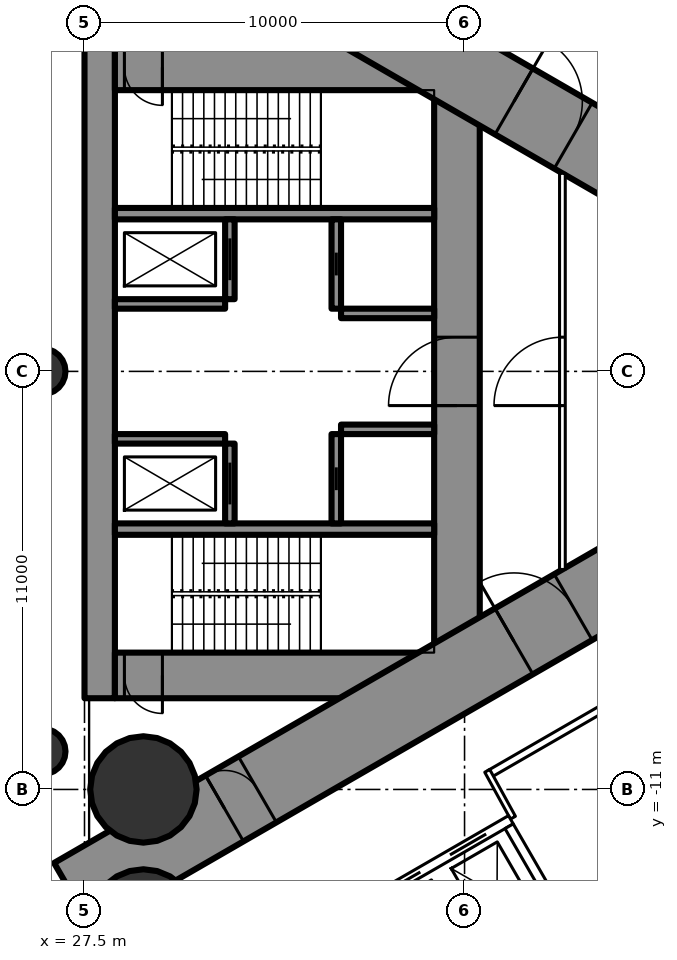
"""IFC4 building model, lengths in metres.
Left out: names, types, materials, properties, quantities, classifications, styles, units other than length and angle.
Written with IfcOpenShell. Run it as: python <this file> out.ifc"""

import sys

from ifc_helpers import new_model, si_unit, direction, frame, frame_2d, origin, origin_2d, place, context, subcontext, project, spatial, rectangle, circle, hollow_circle, extrude, element, fill, save


model = new_model("IFC4")
c1 = context("Model", 3, precision=1e-05, world=origin(), true_north=direction((0.0, 1.0)))
c2 = subcontext(c1, "Body", "Model", "MODEL_VIEW")
j1 = project(units=[si_unit("LENGTHUNIT", "METRE"), si_unit("PLANEANGLEUNIT", "RADIAN")], contexts=[c1])
p1 = place(None, origin())
s1 = spatial("IfcSite", under=j1, at=p1, CompositionType="ELEMENT")
p2 = place(p1, origin())
s2 = spatial("IfcBuilding", under=s1, at=p2, CompositionType="ELEMENT")
p3 = place(p2, frame((0.0, 0.0, 7.2)))
s3 = spatial("IfcBuildingStorey", under=s2, at=p3, CompositionType="ELEMENT", Elevation=7.2)
for number, where, z_axis, x_axis in (
    (1, (29.05, -11.0, 0.0), (0.0, 0.0, 1.0), (1.0, 0.0, 0.0)),
    (2, (29.05, -14.5, 0.0), (0.0, 0.0, 1.0), (1.0, 0.0, 0.0)),
):
    element("IfcColumn", number, at=place(p3, frame(where, z_axis=z_axis, x_axis=x_axis)), inside=s3, PredefinedType="COLUMN", context=c2, shape_type="SweptSolid", body=[
        extrude(hollow_circle(Radius=1.4, WallThickness=0.12, at=origin_2d()), origin(), (0.0, 0.0, 1.0), 5.4),
    ])
p4 = place(p3, frame((27.9, -8.6, 0.0), z_axis=(0.0, 0.0, 1.0), x_axis=(0.0, 1.0, 0.0)))
e3 = element("IfcWall", 3, at=p4, inside=s3, PredefinedType="SHEAR", context=c2, shape_type="SweptSolid", body=[
    extrude(rectangle(XDim=17.2, YDim=0.8, at=frame_2d((8.6, 0.0))), origin(), (0.0, 0.0, 1.0), 5.4),
])
p5 = place(p3, frame((37.3, -8.6, 0.0), z_axis=(0.0, 0.0, 1.0), x_axis=(0.0, 1.0, 0.0)))
e4 = element("IfcWall", 4, at=p5, inside=s3, PredefinedType="SHEAR", context=c2, shape_type="SweptSolid", body=[
    extrude(rectangle(XDim=17.2, YDim=1.2, at=frame_2d((8.6, 0.0))), origin(), (0.0, 0.0, 1.0), 5.4),
])
p6 = place(p5, frame((7.7, 0.0, 0.0)))
e5 = element("IfcOpeningElement", 5, at=p6, cuts=e4, PredefinedType="OPENING", context=c2, shape_type="SweptSolid", body=[
    extrude(rectangle(XDim=1.8, YDim=2.2, at=frame_2d((0.9, 1.1))), frame((0.0, 0.61, 0.0), z_axis=(0.0, -1.0, 0.0), x_axis=(1.0, 0.0, 0.0)), (0.0, 0.0, 1.0), 1.22),
])
p7 = place(p3, frame((28.3, -8.0, 0.0), z_axis=(0.0, 0.0, 1.0), x_axis=(1.0, 0.0, 0.0)))
e6 = element("IfcWall", 6, at=p7, inside=s3, PredefinedType="SHEAR", context=c2, shape_type="SweptSolid", body=[
    extrude(rectangle(XDim=8.4, YDim=1.2, at=frame_2d((4.2, 0.0))), origin(), (0.0, 0.0, 1.0), 5.4),
])
p8 = place(p7, frame((0.25, 0.0, 0.0)))
e7 = element("IfcOpeningElement", 7, at=p8, cuts=e6, PredefinedType="OPENING", context=c2, shape_type="SweptSolid", body=[
    extrude(rectangle(XDim=1.0, YDim=2.2, at=frame_2d((0.5, 1.1))), frame((0.0, 0.61, 0.0), z_axis=(0.0, -1.0, 0.0), x_axis=(1.0, 0.0, 0.0)), (0.0, 0.0, 1.0), 1.22),
])
p9 = place(p3, frame((28.3, 8.0, 0.0), z_axis=(0.0, 0.0, 1.0), x_axis=(1.0, 0.0, 0.0)))
e8 = element("IfcWall", 8, at=p9, inside=s3, PredefinedType="SHEAR", context=c2, shape_type="SweptSolid", body=[
    extrude(rectangle(XDim=8.4, YDim=1.2, at=frame_2d((4.2, 0.0))), origin(), (0.0, 0.0, 1.0), 5.4),
])
p10 = place(p9, frame((0.25, 0.0, 0.0)))
e9 = element("IfcOpeningElement", 9, at=p10, cuts=e8, PredefinedType="OPENING", context=c2, shape_type="SweptSolid", body=[
    extrude(rectangle(XDim=1.0, YDim=2.2, at=frame_2d((0.5, 1.1))), frame((0.0, 0.61, 0.0), z_axis=(0.0, -1.0, 0.0), x_axis=(1.0, 0.0, 0.0)), (0.0, 0.0, 1.0), 1.22),
])
for number, where, z_axis, x_axis in (
    (10, (28.3, -4.15, 0.0), (0.0, 0.0, 1.0), (1.0, 0.0, 0.0)),
    (11, (28.3, 4.15, 0.0), (0.0, 0.0, 1.0), (1.0, 0.0, 0.0)),
):
    element("IfcWall", number, at=place(p3, frame(where, z_axis=z_axis, x_axis=x_axis)), inside=s3, PredefinedType="SHEAR", context=c2, shape_type="SweptSolid", body=[
        extrude(rectangle(XDim=8.4, YDim=0.3, at=frame_2d((4.2, 0.0))), origin(), (0.0, 0.0, 1.0), 5.4),
    ])
p11 = place(p3, frame((31.325, -4.0, 0.0), z_axis=(0.0, 0.0, 1.0), x_axis=(0.0, 1.0, 0.0)))
e12 = element("IfcWall", 12, at=p11, inside=s3, PredefinedType="SHEAR", context=c2, shape_type="SweptSolid", body=[
    extrude(rectangle(XDim=2.1, YDim=0.25, at=frame_2d((1.05, 0.0))), origin(), (0.0, 0.0, 1.0), 5.4),
])
p12 = place(p11, frame((0.5, 0.0, 0.0)))
e13 = element("IfcOpeningElement", 13, at=p12, cuts=e12, PredefinedType="OPENING", context=c2, shape_type="SweptSolid", body=[
    extrude(rectangle(XDim=1.1, YDim=2.2, at=frame_2d((0.55, 1.1))), frame((0.0, 0.135, 0.0), z_axis=(0.0, -1.0, 0.0), x_axis=(1.0, 0.0, 0.0)), (0.0, 0.0, 1.0), 0.27),
])
p13 = place(p3, frame((34.125, -4.0, 0.0), z_axis=(0.0, 0.0, 1.0), x_axis=(0.0, 1.0, 0.0)))
e14 = element("IfcWall", 14, at=p13, inside=s3, PredefinedType="SHEAR", context=c2, shape_type="SweptSolid", body=[
    extrude(rectangle(XDim=2.35, YDim=0.25, at=frame_2d((1.175, 0.0))), origin(), (0.0, 0.0, 1.0), 5.4),
])
p14 = place(p13, frame((0.875, 0.0, 0.0)))
e15 = element("IfcOpeningElement", 15, at=p14, cuts=e14, PredefinedType="OPENING", context=c2, shape_type="SweptSolid", body=[
    extrude(rectangle(XDim=0.6, YDim=2.0, at=frame_2d((0.3, 1.0))), frame((0.0, 0.135, 0.0), z_axis=(0.0, -1.0, 0.0), x_axis=(1.0, 0.0, 0.0)), (0.0, 0.0, 1.0), 0.27),
])
p15 = place(p3, frame((28.3, -1.775, 0.0), z_axis=(0.0, 0.0, 1.0), x_axis=(1.0, 0.0, 0.0)))
e16 = element("IfcWall", 16, at=p15, inside=s3, PredefinedType="SHEAR", context=c2, shape_type="SweptSolid", body=[
    extrude(rectangle(XDim=2.9, YDim=0.25, at=frame_2d((1.45, 0.0))), origin(), (0.0, 0.0, 1.0), 5.4),
])
p16 = place(p3, frame((34.25, -1.525, 0.0), z_axis=(0.0, 0.0, 1.0), x_axis=(1.0, 0.0, 0.0)))
e17 = element("IfcWall", 17, at=p16, inside=s3, PredefinedType="SHEAR", context=c2, shape_type="SweptSolid", body=[
    extrude(rectangle(XDim=2.45, YDim=0.25, at=frame_2d((1.225, 0.0))), origin(), (0.0, 0.0, 1.0), 5.4),
])
p17 = place(p3, frame((31.325, 1.9, 0.0), z_axis=(0.0, 0.0, 1.0), x_axis=(0.0, 1.0, 0.0)))
e18 = element("IfcWall", 18, at=p17, inside=s3, PredefinedType="SHEAR", context=c2, shape_type="SweptSolid", body=[
    extrude(rectangle(XDim=2.1, YDim=0.25, at=frame_2d((1.05, 0.0))), origin(), (0.0, 0.0, 1.0), 5.4),
])
p18 = place(p17, frame((0.5, 0.0, 0.0)))
e19 = element("IfcOpeningElement", 19, at=p18, cuts=e18, PredefinedType="OPENING", context=c2, shape_type="SweptSolid", body=[
    extrude(rectangle(XDim=1.1, YDim=2.2, at=frame_2d((0.55, 1.1))), frame((0.0, 0.135, 0.0), z_axis=(0.0, -1.0, 0.0), x_axis=(1.0, 0.0, 0.0)), (0.0, 0.0, 1.0), 0.27),
])
p19 = place(p3, frame((34.125, 1.65, 0.0), z_axis=(0.0, 0.0, 1.0), x_axis=(0.0, 1.0, 0.0)))
e20 = element("IfcWall", 20, at=p19, inside=s3, PredefinedType="SHEAR", context=c2, shape_type="SweptSolid", body=[
    extrude(rectangle(XDim=2.35, YDim=0.25, at=frame_2d((1.175, 0.0))), origin(), (0.0, 0.0, 1.0), 5.4),
])
p20 = place(p19, frame((0.875, 0.0, 0.0)))
e21 = element("IfcOpeningElement", 21, at=p20, cuts=e20, PredefinedType="OPENING", context=c2, shape_type="SweptSolid", body=[
    extrude(rectangle(XDim=0.6, YDim=2.0, at=frame_2d((0.3, 1.0))), frame((0.0, 0.135, 0.0), z_axis=(0.0, -1.0, 0.0), x_axis=(1.0, 0.0, 0.0)), (0.0, 0.0, 1.0), 0.27),
])
p21 = place(p3, frame((28.3, 1.775, 0.0), z_axis=(0.0, 0.0, 1.0), x_axis=(1.0, 0.0, 0.0)))
e22 = element("IfcWall", 22, at=p21, inside=s3, PredefinedType="SHEAR", context=c2, shape_type="SweptSolid", body=[
    extrude(rectangle(XDim=2.9, YDim=0.25, at=frame_2d((1.45, 0.0))), origin(), (0.0, 0.0, 1.0), 5.4),
])
p22 = place(p3, frame((34.25, 1.525, 0.0), z_axis=(0.0, 0.0, 1.0), x_axis=(1.0, 0.0, 0.0)))
e23 = element("IfcWall", 23, at=p22, inside=s3, PredefinedType="SHEAR", context=c2, shape_type="SweptSolid", body=[
    extrude(rectangle(XDim=2.45, YDim=0.25, at=frame_2d((1.225, 0.0))), origin(), (0.0, 0.0, 1.0), 5.4),
])
p23 = place(p3, frame((27.2, -13.8, 0.0), z_axis=(0.0, 0.0, 1.0), x_axis=(0.866027159892, 0.499996958321, 0.0)))
e24 = element("IfcWall", 24, at=p23, inside=s3, PredefinedType="SHEAR", context=c2, shape_type="SweptSolid", body=[
    extrude(rectangle(XDim=27.947, YDim=2.0, at=frame_2d((13.973, 0.0))), origin(), (0.0, 0.0, 1.0), 5.4),
])
p24 = place(p23, frame((4.6, 0.0, 0.0)))
e25 = element("IfcOpeningElement", 25, at=p24, cuts=e24, PredefinedType="OPENING", context=c2, shape_type="SweptSolid", body=[
    extrude(rectangle(XDim=1.0, YDim=2.2, at=frame_2d((0.5, 1.1))), frame((0.0, 1.01, 0.0), z_axis=(0.0, -1.0, 0.0), x_axis=(1.0, 0.0, 0.0)), (0.0, 0.0, 1.0), 2.02),
])
p25 = place(p23, frame((13.395, 0.0, 0.0)))
e26 = element("IfcOpeningElement", 26, at=p25, cuts=e24, PredefinedType="OPENING", context=c2, shape_type="SweptSolid", body=[
    extrude(rectangle(XDim=1.8, YDim=2.2, at=frame_2d((0.9, 1.1))), frame((0.0, 1.01, 0.0), z_axis=(0.0, -1.0, 0.0), x_axis=(1.0, 0.0, 0.0)), (0.0, 0.0, 1.0), 2.02),
])
p26 = place(p3, frame((27.2, 13.8, 0.0), z_axis=(0.0, 0.0, 1.0), x_axis=(0.866024545924, -0.500001485854, 0.0)))
e27 = element("IfcWall", 27, at=p26, inside=s3, PredefinedType="SHEAR", context=c2, shape_type="SweptSolid", body=[
    extrude(rectangle(XDim=26.534, YDim=2.0, at=frame_2d((13.267, 0.0))), origin(), (0.0, 0.0, 1.0), 5.4),
])
p27 = place(p26, frame((4.6, 0.0, 0.0)))
e28 = element("IfcOpeningElement", 28, at=p27, cuts=e27, PredefinedType="OPENING", context=c2, shape_type="SweptSolid", body=[
    extrude(rectangle(XDim=1.0, YDim=2.2, at=frame_2d((0.5, 1.1))), frame((0.0, 1.01, 0.0), z_axis=(0.0, -1.0, 0.0), x_axis=(1.0, 0.0, 0.0)), (0.0, 0.0, 1.0), 2.02),
])
p28 = place(p26, frame((13.395, 0.0, 0.0)))
e29 = element("IfcOpeningElement", 29, at=p28, cuts=e27, PredefinedType="OPENING", context=c2, shape_type="SweptSolid", body=[
    extrude(rectangle(XDim=1.8, YDim=2.2, at=frame_2d((0.9, 1.1))), frame((0.0, 1.01, 0.0), z_axis=(0.0, -1.0, 0.0), x_axis=(1.0, 0.0, 0.0)), (0.0, 0.0, 1.0), 2.02),
])
for number, where, z_axis, x_axis in (
    (30, (26.4, -10.0, 0.0), (0.0, 0.0, 1.0), (1.0, 0.0, 0.0)),
    (31, (26.4, 0.0, 0.0), (0.0, 0.0, 1.0), (1.0, 0.0, 0.0)),
):
    element("IfcColumn", number, at=place(p3, frame(where, z_axis=z_axis, x_axis=x_axis)), inside=s3, PredefinedType="COLUMN", context=c2, shape_type="SweptSolid", body=[
        extrude(circle(Radius=0.6, at=origin_2d()), origin(), (0.0, 0.0, 1.0), 5.4),
    ])
p29 = place(p3, frame((38.16, -10.59, 0.0), z_axis=(0.0, 0.0, 1.0), x_axis=(0.866027029586, 0.499997184019, 0.0)))
e32 = element("IfcWall", 32, at=p29, inside=s3, PredefinedType="PARTITIONING", context=c2, shape_type="SweptSolid", body=[
    extrude(rectangle(XDim=21.18, YDim=0.2, at=frame_2d((10.59, 0.0))), origin(), (0.0, 0.0, 1.0), 5.05),
])
p30 = place(p29, frame((14.142, 0.0, 0.0)))
e33 = element("IfcOpeningElement", 33, at=p30, cuts=e32, PredefinedType="OPENING", context=c2, shape_type="SweptSolid", body=[
    extrude(rectangle(XDim=1.8, YDim=2.2, at=frame_2d((0.9, 1.1))), frame((0.0, 0.11, 0.0), z_axis=(0.0, -1.0, 0.0), x_axis=(1.0, 0.0, 0.0)), (0.0, 0.0, 1.0), 0.22),
])
p31 = place(p29, frame((18.183, 0.0, 0.0)))
e34 = element("IfcOpeningElement", 34, at=p31, cuts=e32, PredefinedType="OPENING", context=c2, shape_type="SweptSolid", body=[
    extrude(rectangle(XDim=1.8, YDim=2.2, at=frame_2d((0.9, 1.1))), frame((0.0, 0.11, 0.0), z_axis=(0.0, -1.0, 0.0), x_axis=(1.0, 0.0, 0.0)), (0.0, 0.0, 1.0), 0.22),
])
p32 = place(p29, frame((5.65, 0.0, 0.0)))
e35 = element("IfcOpeningElement", 35, at=p32, cuts=e32, PredefinedType="OPENING", context=c2, shape_type="SweptSolid", body=[
    extrude(rectangle(XDim=1.8, YDim=2.2, at=frame_2d((0.9, 1.1))), frame((0.0, 0.11, 0.0), z_axis=(0.0, -1.0, 0.0), x_axis=(1.0, 0.0, 0.0)), (0.0, 0.0, 1.0), 0.22),
])
p33 = place(p3, frame((37.034, 11.24, 0.0), z_axis=(0.0, 0.0, 1.0), x_axis=(0.866025942536, -0.499999066854, 0.0)))
e36 = element("IfcWall", 36, at=p33, inside=s3, PredefinedType="PARTITIONING", context=c2, shape_type="SweptSolid", body=[
    extrude(rectangle(XDim=22.36, YDim=0.2, at=frame_2d((11.18, 0.0))), origin(), (0.0, 0.0, 1.0), 5.05),
])
p34 = place(p33, frame((19.423, 0.0, 0.0)))
e37 = element("IfcOpeningElement", 37, at=p34, cuts=e36, PredefinedType="OPENING", context=c2, shape_type="SweptSolid", body=[
    extrude(rectangle(XDim=1.8, YDim=2.2, at=frame_2d((0.9, 1.1))), frame((0.0, 0.11, 0.0), z_axis=(0.0, -1.0, 0.0), x_axis=(1.0, 0.0, 0.0)), (0.0, 0.0, 1.0), 0.22),
])
p35 = place(p33, frame((13.274, 0.0, 0.0)))
e38 = element("IfcOpeningElement", 38, at=p35, cuts=e36, PredefinedType="OPENING", context=c2, shape_type="SweptSolid", body=[
    extrude(rectangle(XDim=1.8, YDim=2.2, at=frame_2d((0.9, 1.1))), frame((0.0, 0.11, 0.0), z_axis=(0.0, -1.0, 0.0), x_axis=(1.0, 0.0, 0.0)), (0.0, 0.0, 1.0), 0.22),
])
p36 = place(p33, frame((4.602, 0.0, 0.0)))
e39 = element("IfcOpeningElement", 39, at=p36, cuts=e36, PredefinedType="OPENING", context=c2, shape_type="SweptSolid", body=[
    extrude(rectangle(XDim=1.8, YDim=2.2, at=frame_2d((0.9, 1.1))), frame((0.0, 0.11, 0.0), z_axis=(0.0, -1.0, 0.0), x_axis=(1.0, 0.0, 0.0)), (0.0, 0.0, 1.0), 0.22),
])
p37 = place(p3, frame((38.773, -11.742, 0.0), z_axis=(0.0, 0.0, 1.0), x_axis=(-0.481418475768, 0.876490873421, 0.0)))
e40 = element("IfcWall", 40, at=p37, inside=s3, PredefinedType="PARTITIONING", context=c2, shape_type="SweptSolid", body=[
    extrude(rectangle(XDim=1.405, YDim=0.15, at=frame_2d((0.703, 0.0))), origin(), (0.0, 0.0, 1.0), 5.05),
])
p38 = place(p3, frame((40.075, -5.212, 0.0), z_axis=(0.0, 0.0, 1.0), x_axis=(0.0, 1.0, 0.0)))
e41 = element("IfcWall", 41, at=p38, inside=s3, PredefinedType="PARTITIONING", context=c2, shape_type="SweptSolid", body=[
    extrude(rectangle(XDim=10.424, YDim=0.15, at=frame_2d((5.212, 0.0))), origin(), (0.0, 0.0, 1.0), 5.05),
])
p39 = place(p38, frame((4.312, 0.0, 0.0)))
e42 = element("IfcOpeningElement", 42, at=p39, cuts=e41, PredefinedType="OPENING", context=c2, shape_type="SweptSolid", body=[
    extrude(rectangle(XDim=1.8, YDim=2.2, at=frame_2d((0.9, 1.1))), frame((0.0, 0.085, 0.0), z_axis=(0.0, -1.0, 0.0), x_axis=(1.0, 0.0, 0.0)), (0.0, 0.0, 1.0), 0.17),
])
p40 = place(p3, frame((31.271, -16.097, 0.0), z_axis=(0.0, 0.0, 1.0), x_axis=(0.86604045752, 0.499973925258, 0.0)))
e43 = element("IfcWall", 43, at=p40, inside=s3, PredefinedType="PARTITIONING", context=c2, shape_type="SweptSolid", body=[
    extrude(rectangle(XDim=8.6, YDim=0.25, at=frame_2d((4.3, 0.0))), origin(), (0.0, 0.0, 1.0), 5.05),
])
p41 = place(p40, frame((0.75, 0.0, 0.0)))
e44 = element("IfcOpeningElement", 44, at=p41, cuts=e43, PredefinedType="OPENING", context=c2, shape_type="SweptSolid", body=[
    extrude(rectangle(XDim=1.1, YDim=2.2, at=frame_2d((0.55, 1.1))), frame((0.0, 0.135, 0.0), z_axis=(0.0, -1.0, 0.0), x_axis=(1.0, 0.0, 0.0)), (0.0, 0.0, 1.0), 0.27),
])
p42 = place(p40, frame((2.75, 0.0, 0.0)))
e45 = element("IfcOpeningElement", 45, at=p42, cuts=e43, PredefinedType="OPENING", context=c2, shape_type="SweptSolid", body=[
    extrude(rectangle(XDim=1.1, YDim=2.2, at=frame_2d((0.55, 1.1))), frame((0.0, 0.135, 0.0), z_axis=(0.0, -1.0, 0.0), x_axis=(1.0, 0.0, 0.0)), (0.0, 0.0, 1.0), 0.27),
])
p43 = place(p40, frame((4.75, 0.0, 0.0)))
e46 = element("IfcOpeningElement", 46, at=p43, cuts=e43, PredefinedType="OPENING", context=c2, shape_type="SweptSolid", body=[
    extrude(rectangle(XDim=1.1, YDim=2.2, at=frame_2d((0.55, 1.1))), frame((0.0, 0.135, 0.0), z_axis=(0.0, -1.0, 0.0), x_axis=(1.0, 0.0, 0.0)), (0.0, 0.0, 1.0), 0.27),
])
p44 = place(p40, frame((6.75, 0.0, 0.0)))
e47 = element("IfcOpeningElement", 47, at=p44, cuts=e43, PredefinedType="OPENING", context=c2, shape_type="SweptSolid", body=[
    extrude(rectangle(XDim=1.1, YDim=2.2, at=frame_2d((0.55, 1.1))), frame((0.0, 0.135, 0.0), z_axis=(0.0, -1.0, 0.0), x_axis=(1.0, 0.0, 0.0)), (0.0, 0.0, 1.0), 0.27),
])
p45 = place(p3, frame((38.673, -11.968, 0.0), z_axis=(0.0, 0.0, 1.0), x_axis=(0.499929347863, -0.866066190972, 0.0)))
e48 = element("IfcWall", 48, at=p45, inside=s3, PredefinedType="PARTITIONING", context=c2, shape_type="SweptSolid", body=[
    extrude(rectangle(XDim=3.201, YDim=0.25, at=frame_2d((1.6, 0.0))), origin(), (0.0, 0.0, 1.0), 5.05),
])
p46 = place(p39, origin())
e49 = element("IfcDoor", 49, at=p46, inside=s3, OperationType="DOUBLE_DOOR_SINGLE_SWING", PredefinedType="DOOR", context=c2, shape_type="SweptSolid", body=[
    extrude(rectangle(XDim=1.8, YDim=2.2, at=frame_2d((0.9, 1.1))), frame((0.0, 0.025, 0.0), z_axis=(0.0, -1.0, 0.0), x_axis=(1.0, 0.0, 0.0)), (0.0, 0.0, 1.0), 0.05),
])
fill(e42, e49)
p47 = place(p24, origin())
e50 = element("IfcDoor", 50, at=p47, inside=s3, OperationType="SINGLE_SWING_LEFT", PredefinedType="DOOR", context=c2, shape_type="SweptSolid", body=[
    extrude(rectangle(XDim=1.0, YDim=2.2, at=frame_2d((0.5, 1.1))), frame((0.0, 0.025, 0.0), z_axis=(0.0, -1.0, 0.0), x_axis=(1.0, 0.0, 0.0)), (0.0, 0.0, 1.0), 0.05),
])
fill(e25, e50)
p48 = place(p25, origin())
e51 = element("IfcDoor", 51, at=p48, inside=s3, OperationType="DOUBLE_DOOR_SINGLE_SWING", PredefinedType="DOOR", context=c2, shape_type="SweptSolid", body=[
    extrude(rectangle(XDim=1.8, YDim=2.2, at=frame_2d((0.9, 1.1))), frame((0.0, 0.025, 0.0), z_axis=(0.0, -1.0, 0.0), x_axis=(1.0, 0.0, 0.0)), (0.0, 0.0, 1.0), 0.05),
])
fill(e26, e51)
p49 = place(p28, origin())
e52 = element("IfcDoor", 52, at=p49, inside=s3, OperationType="DOUBLE_DOOR_SINGLE_SWING", PredefinedType="DOOR", context=c2, shape_type="SweptSolid", body=[
    extrude(rectangle(XDim=1.8, YDim=2.2, at=frame_2d((0.9, 1.1))), frame((0.0, 0.025, 0.0), z_axis=(0.0, -1.0, 0.0), x_axis=(1.0, 0.0, 0.0)), (0.0, 0.0, 1.0), 0.05),
])
fill(e29, e52)
p50 = place(p6, origin())
e53 = element("IfcDoor", 53, at=p50, inside=s3, OperationType="DOUBLE_DOOR_SINGLE_SWING", PredefinedType="DOOR", context=c2, shape_type="SweptSolid", body=[
    extrude(rectangle(XDim=1.8, YDim=2.2, at=frame_2d((0.9, 1.1))), frame((0.0, 0.025, 0.0), z_axis=(0.0, -1.0, 0.0), x_axis=(1.0, 0.0, 0.0)), (0.0, 0.0, 1.0), 0.05),
])
fill(e5, e53)
p51 = place(p8, origin())
e54 = element("IfcDoor", 54, at=p51, inside=s3, OperationType="SINGLE_SWING_RIGHT", PredefinedType="DOOR", context=c2, shape_type="SweptSolid", body=[
    extrude(rectangle(XDim=1.0, YDim=2.2, at=frame_2d((0.5, 1.1))), frame((0.0, 0.025, 0.0), z_axis=(0.0, -1.0, 0.0), x_axis=(1.0, 0.0, 0.0)), (0.0, 0.0, 1.0), 0.05),
])
fill(e7, e54)
p52 = place(p10, origin())
e55 = element("IfcDoor", 55, at=p52, inside=s3, OperationType="SINGLE_SWING_RIGHT", PredefinedType="DOOR", context=c2, shape_type="SweptSolid", body=[
    extrude(rectangle(XDim=1.0, YDim=2.2, at=frame_2d((0.5, 1.1))), frame((0.0, 0.025, 0.0), z_axis=(0.0, -1.0, 0.0), x_axis=(1.0, 0.0, 0.0)), (0.0, 0.0, 1.0), 0.05),
])
fill(e9, e55)
p53 = place(p12, origin())
e56 = element("IfcDoor", 56, at=p53, inside=s3, OperationType="SLIDING_TO_LEFT", PredefinedType="USERDEFINED", context=c2, shape_type="SweptSolid", body=[
    extrude(rectangle(XDim=1.1, YDim=2.2, at=frame_2d((0.55, 1.1))), frame((0.0, 0.025, 0.0), z_axis=(0.0, -1.0, 0.0), x_axis=(1.0, 0.0, 0.0)), (0.0, 0.0, 1.0), 0.05),
])
fill(e13, e56)
p54 = place(p18, origin())
e57 = element("IfcDoor", 57, at=p54, inside=s3, OperationType="SLIDING_TO_LEFT", PredefinedType="USERDEFINED", context=c2, shape_type="SweptSolid", body=[
    extrude(rectangle(XDim=1.1, YDim=2.2, at=frame_2d((0.55, 1.1))), frame((0.0, 0.025, 0.0), z_axis=(0.0, -1.0, 0.0), x_axis=(1.0, 0.0, 0.0)), (0.0, 0.0, 1.0), 0.05),
])
fill(e19, e57)
p55 = place(p14, origin())
e58 = element("IfcDoor", 58, at=p55, inside=s3, OperationType="SLIDING_TO_LEFT", PredefinedType="DOOR", context=c2, shape_type="SweptSolid", body=[
    extrude(rectangle(XDim=0.6, YDim=2.0, at=frame_2d((0.3, 1.0))), frame((0.0, 0.025, 0.0), z_axis=(0.0, -1.0, 0.0), x_axis=(1.0, 0.0, 0.0)), (0.0, 0.0, 1.0), 0.05),
])
fill(e15, e58)
p56 = place(p20, origin())
e59 = element("IfcDoor", 59, at=p56, inside=s3, OperationType="SLIDING_TO_LEFT", PredefinedType="DOOR", context=c2, shape_type="SweptSolid", body=[
    extrude(rectangle(XDim=0.6, YDim=2.0, at=frame_2d((0.3, 1.0))), frame((0.0, 0.025, 0.0), z_axis=(0.0, -1.0, 0.0), x_axis=(1.0, 0.0, 0.0)), (0.0, 0.0, 1.0), 0.05),
])
fill(e21, e59)
p57 = place(p43, origin())
e60 = element("IfcDoor", 60, at=p57, inside=s3, OperationType="DOUBLE_DOOR_SLIDING", PredefinedType="USERDEFINED", context=c2, shape_type="SweptSolid", body=[
    extrude(rectangle(XDim=1.1, YDim=2.2, at=frame_2d((0.55, 1.1))), frame((0.0, 0.025, 0.0), z_axis=(0.0, -1.0, 0.0), x_axis=(1.0, 0.0, 0.0)), (0.0, 0.0, 1.0), 0.05),
])
fill(e46, e60)
p58 = place(p44, origin())
e61 = element("IfcDoor", 61, at=p58, inside=s3, OperationType="DOUBLE_DOOR_SLIDING", PredefinedType="USERDEFINED", context=c2, shape_type="SweptSolid", body=[
    extrude(rectangle(XDim=1.1, YDim=2.2, at=frame_2d((0.55, 1.1))), frame((0.0, 0.025, 0.0), z_axis=(0.0, -1.0, 0.0), x_axis=(1.0, 0.0, 0.0)), (0.0, 0.0, 1.0), 0.05),
])
fill(e47, e61)
save(model, sys.argv[1])
